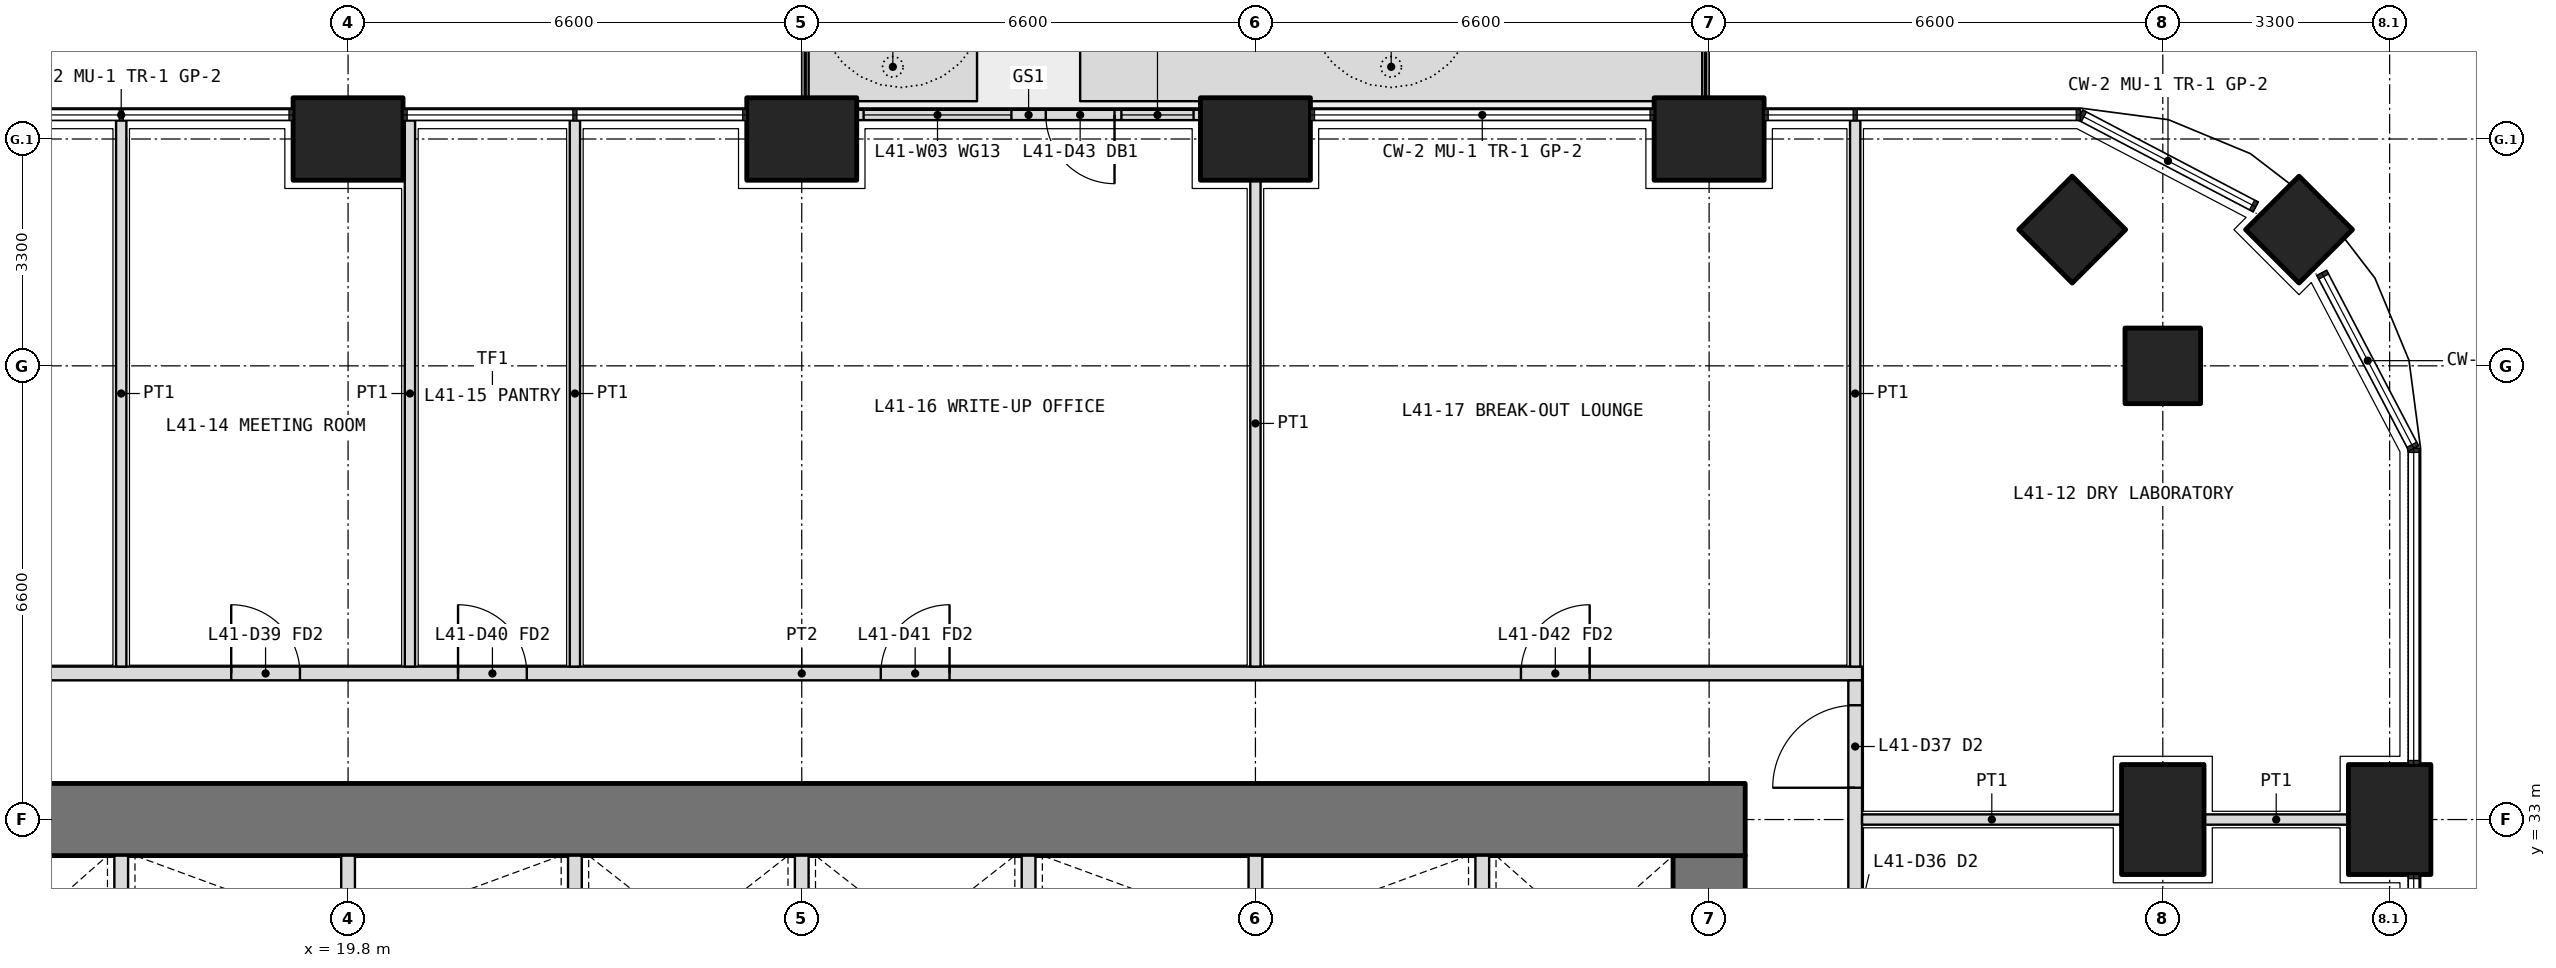
"""IFC4 building model, lengths in metres.
Left out: names, types, materials, properties, quantities, classifications, styles, units other than length and angle.
Written with IfcOpenShell. Run it as: python <this file> out.ifc"""

import sys

from ifc_helpers import new_model, si_unit, direction, frame, frame_2d, origin, origin_2d, place, context, subcontext, project, spatial, polyline, rectangle, outline, extrude, element, fill, save


model = new_model("IFC4")
c1 = context("Model", 3, precision=1e-05, world=origin(), true_north=direction((0.0, 1.0)))
c2 = subcontext(c1, "Body", "Model", "MODEL_VIEW")
j1 = project(units=[si_unit("LENGTHUNIT", "METRE"), si_unit("PLANEANGLEUNIT", "RADIAN")], contexts=[c1])
p1 = place(None, origin())
s1 = spatial("IfcSite", under=j1, at=p1, CompositionType="ELEMENT")
p2 = place(p1, origin())
s2 = spatial("IfcBuilding", under=s1, at=p2, CompositionType="ELEMENT")
p3 = place(p2, frame((0.0, 0.0, 180.9)))
s3 = spatial("IfcBuildingStorey", under=s2, at=p3, CompositionType="ELEMENT", Elevation=180.9)
p4 = place(p3, frame((48.182, 41.582, 0.0), z_axis=(0.0, 0.0, 1.0), x_axis=(0.707106781187, 0.707106781187, 0.0)))
e1 = element("IfcColumn", 1, at=p4, inside=s3, PredefinedType="COLUMN", context=c2, shape_type="SweptSolid", body=[
    extrude(rectangle(XDim=1.1, YDim=1.1, at=origin_2d()), origin(), (0.0, 0.0, 1.0), 4.2),
])
for number, where, z_axis, x_axis in (
    (2, (49.5, 33.0, 0.0), (0.0, 0.0, 1.0), (0.0, 1.0, 0.0)),
    (3, (19.8, 42.9, 0.0), (0.0, 0.0, 1.0), (1.0, 0.0, 0.0)),
    (4, (26.4, 42.9, 0.0), (0.0, 0.0, 1.0), (1.0, 0.0, 0.0)),
    (5, (33.0, 42.9, 0.0), (0.0, 0.0, 1.0), (1.0, 0.0, 0.0)),
    (6, (39.6, 42.9, 0.0), (0.0, 0.0, 1.0), (1.0, 0.0, 0.0)),
):
    element("IfcColumn", number, at=place(p3, frame(where, z_axis=z_axis, x_axis=x_axis)), inside=s3, PredefinedType="COLUMN", context=c2, shape_type="SweptSolid", body=[
        extrude(rectangle(XDim=1.6, YDim=1.2, at=origin_2d()), origin(), (0.0, 0.0, 1.0), 4.2),
    ])
for number, where, z_axis, x_axis in (
    (7, (46.2, 39.6, 0.0), (0.0, 0.0, 1.0), (1.0, 0.0, 0.0)),
    (8, (44.882, 41.582, 0.0), (0.0, 0.0, 1.0), (0.707, 0.707, 0.0)),
):
    element("IfcColumn", number, at=place(p3, frame(where, z_axis=z_axis, x_axis=x_axis)), inside=s3, PredefinedType="COLUMN", context=c2, shape_type="SweptSolid", body=[
        extrude(rectangle(XDim=1.1, YDim=1.1, at=origin_2d()), origin(), (0.0, 0.0, 1.0), 4.2),
    ])
p5 = place(p3, frame((46.2, 33.0, 0.0), z_axis=(0.0, 0.0, 1.0), x_axis=(0.0, 1.0, 0.0)))
e9 = element("IfcColumn", 9, at=p5, inside=s3, PredefinedType="COLUMN", context=c2, shape_type="SweptSolid", body=[
    extrude(rectangle(XDim=1.6, YDim=1.2, at=origin_2d()), origin(), (0.0, 0.0, 1.0), 4.2),
])
p6 = place(p3, origin())
e10 = element("IfcWall", 10, at=p6, inside=s3, PredefinedType="USERDEFINED", context=c2, shape_type="SweptSolid", body=[
    extrude(outline(polyline([(26.5, 43.45), (28.95, 43.45), (28.95, 44.45), (26.5, 44.45), (26.5, 43.45)]), holes=[polyline([(26.65, 43.6), (28.8, 43.6), (28.8, 44.3), (26.65, 44.3), (26.65, 43.6)])]), origin(), (0.0, 0.0, 1.0), 1.05),
])
p7 = place(p3, origin())
e11 = element("IfcWall", 11, at=p7, inside=s3, PredefinedType="USERDEFINED", context=c2, shape_type="SweptSolid", body=[
    extrude(outline(polyline([(30.45, 43.45), (39.5, 43.45), (39.5, 44.45), (30.45, 44.45), (30.45, 43.45)]), holes=[polyline([(30.6, 43.6), (39.35, 43.6), (39.35, 44.3), (30.6, 44.3), (30.6, 43.6)])]), origin(), (0.0, 0.0, 1.0), 1.05),
])
p8 = place(p3, frame((32.2, 43.25, 0.0), z_axis=(0.0, 0.0, 1.0), x_axis=(-1.0, 0.0, 0.0)))
e12 = element("IfcWall", 12, at=p8, inside=s3, PredefinedType="SOLIDWALL", context=c2, shape_type="SweptSolid", body=[
    extrude(rectangle(XDim=5.0, YDim=0.15, at=frame_2d((2.5, 0.0))), origin(), (0.0, 0.0, 1.0), 2.7),
])
p9 = place(p8, frame((1.25, 0.0, 0.0)))
e13 = element("IfcOpeningElement", 13, at=p9, cuts=e12, PredefinedType="OPENING", context=c2, shape_type="SweptSolid", body=[
    extrude(rectangle(XDim=1.0, YDim=2.4, at=frame_2d((0.5, 1.2))), frame((0.0, 0.085, 0.0), z_axis=(0.0, -1.0, 0.0), x_axis=(1.0, 0.0, 0.0)), (0.0, 0.0, 1.0), 0.17),
])
p10 = place(p8, frame((0.1, 0.0, 0.1)))
e14 = element("IfcOpeningElement", 14, at=p10, cuts=e12, PredefinedType="OPENING", context=c2, shape_type="SweptSolid", body=[
    extrude(rectangle(XDim=1.05, YDim=2.3, at=frame_2d((0.525, 1.15))), frame((0.0, 0.085, 0.0), z_axis=(0.0, -1.0, 0.0), x_axis=(1.0, 0.0, 0.0)), (0.0, 0.0, 1.0), 0.17),
])
p11 = place(p8, frame((2.75, 0.0, 0.1)))
e15 = element("IfcOpeningElement", 15, at=p11, cuts=e12, PredefinedType="OPENING", context=c2, shape_type="SweptSolid", body=[
    extrude(rectangle(XDim=2.15, YDim=2.3, at=frame_2d((1.075, 1.15))), frame((0.0, 0.085, 0.0), z_axis=(0.0, -1.0, 0.0), x_axis=(1.0, 0.0, 0.0)), (0.0, 0.0, 1.0), 0.17),
])
p12 = place(p3, frame((39.6, 13.725, 0.0), z_axis=(0.0, 0.0, 1.0), x_axis=(0.0, 1.0, 0.0)))
e16 = element("IfcWall", 16, at=p12, inside=s3, PredefinedType="SHEAR", context=c2, shape_type="SweptSolid", body=[
    extrude(rectangle(XDim=18.75, YDim=1.05, at=frame_2d((9.375, 0.0))), origin(), (0.0, 0.0, 1.0), 4.2),
])
p13 = place(p12, frame((3.025, 0.0, 0.0)))
e17 = element("IfcOpeningElement", 17, at=p13, cuts=e16, PredefinedType="OPENING", context=c2, shape_type="SweptSolid", body=[
    extrude(rectangle(XDim=1.6, YDim=2.1, at=frame_2d((0.8, 1.05))), frame((0.0, 0.535, 0.0), z_axis=(0.0, -1.0, 0.0), x_axis=(1.0, 0.0, 0.0)), (0.0, 0.0, 1.0), 1.07),
])
p14 = place(p12, frame((13.825, 0.0, 0.0)))
e18 = element("IfcOpeningElement", 18, at=p14, cuts=e16, PredefinedType="OPENING", context=c2, shape_type="SweptSolid", body=[
    extrude(rectangle(XDim=1.6, YDim=2.1, at=frame_2d((0.8, 1.05))), frame((0.0, 0.535, 0.0), z_axis=(0.0, -1.0, 0.0), x_axis=(1.0, 0.0, 0.0)), (0.0, 0.0, 1.0), 1.07),
])
p15 = place(p3, frame((40.125, 33.0, 0.0), z_axis=(0.0, 0.0, 1.0), x_axis=(-1.0, 0.0, 0.0)))
e19 = element("IfcWall", 19, at=p15, inside=s3, PredefinedType="SHEAR", context=c2, shape_type="SweptSolid", body=[
    extrude(rectangle(XDim=27.45, YDim=1.05, at=frame_2d((13.725, 0.0))), origin(), (0.0, 0.0, 1.0), 4.2),
])
for number, where, z_axis, x_axis in (
    (20, (16.5, 30.2, 0.0), (0.0, 0.0, 1.0), (0.0, 1.0, 0.0)),
    (21, (19.8, 30.2, 0.0), (0.0, 0.0, 1.0), (0.0, 1.0, 0.0)),
    (22, (23.1, 30.2, 0.0), (0.0, 0.0, 1.0), (0.0, 1.0, 0.0)),
    (23, (26.4, 30.2, 0.0), (0.0, 0.0, 1.0), (0.0, 1.0, 0.0)),
    (24, (29.7, 30.2, 0.0), (0.0, 0.0, 1.0), (0.0, 1.0, 0.0)),
    (25, (33.0, 30.2, 0.0), (0.0, 0.0, 1.0), (0.0, 1.0, 0.0)),
    (26, (36.3, 30.2, 0.0), (0.0, 0.0, 1.0), (0.0, 1.0, 0.0)),
):
    element("IfcWall", number, at=place(p3, frame(where, z_axis=z_axis, x_axis=x_axis)), inside=s3, PredefinedType="PARTITIONING", context=c2, shape_type="SweptSolid", body=[
        extrude(rectangle(XDim=2.275, YDim=0.2, at=frame_2d((1.138, 0.0))), origin(), (0.0, 0.0, 1.0), 4.2),
    ])
p16 = place(p3, frame((10.975, 35.125, 0.0), z_axis=(0.0, 0.0, 1.0), x_axis=(1.0, 0.0, 0.0)))
e27 = element("IfcWall", 27, at=p16, inside=s3, PredefinedType="PARTITIONING", context=c2, shape_type="SweptSolid", body=[
    extrude(rectangle(XDim=30.85, YDim=0.2, at=frame_2d((15.425, 0.0))), origin(), (0.0, 0.0, 1.0), 2.85),
])
p17 = place(p16, frame((2.312, 0.0, 0.0)))
e28 = element("IfcOpeningElement", 28, at=p17, cuts=e27, PredefinedType="OPENING", context=c2, shape_type="SweptSolid", body=[
    extrude(rectangle(XDim=1.0, YDim=2.1, at=frame_2d((0.5, 1.05))), frame((0.0, 0.11, 0.0), z_axis=(0.0, -1.0, 0.0), x_axis=(1.0, 0.0, 0.0)), (0.0, 0.0, 1.0), 0.22),
])
p18 = place(p16, frame((7.125, 0.0, 0.0)))
e29 = element("IfcOpeningElement", 29, at=p18, cuts=e27, PredefinedType="OPENING", context=c2, shape_type="SweptSolid", body=[
    extrude(rectangle(XDim=1.0, YDim=2.1, at=frame_2d((0.5, 1.05))), frame((0.0, 0.11, 0.0), z_axis=(0.0, -1.0, 0.0), x_axis=(1.0, 0.0, 0.0)), (0.0, 0.0, 1.0), 0.22),
])
p19 = place(p16, frame((10.425, 0.0, 0.0)))
e30 = element("IfcOpeningElement", 30, at=p19, cuts=e27, PredefinedType="OPENING", context=c2, shape_type="SweptSolid", body=[
    extrude(rectangle(XDim=1.0, YDim=2.1, at=frame_2d((0.5, 1.05))), frame((0.0, 0.11, 0.0), z_axis=(0.0, -1.0, 0.0), x_axis=(1.0, 0.0, 0.0)), (0.0, 0.0, 1.0), 0.22),
])
p20 = place(p16, frame((16.575, 0.0, 0.0)))
e31 = element("IfcOpeningElement", 31, at=p20, cuts=e27, PredefinedType="OPENING", context=c2, shape_type="SweptSolid", body=[
    extrude(rectangle(XDim=1.0, YDim=2.1, at=frame_2d((0.5, 1.05))), frame((0.0, 0.11, 0.0), z_axis=(0.0, -1.0, 0.0), x_axis=(1.0, 0.0, 0.0)), (0.0, 0.0, 1.0), 0.22),
])
p21 = place(p16, frame((25.887, 0.0, 0.0)))
e32 = element("IfcOpeningElement", 32, at=p21, cuts=e27, PredefinedType="OPENING", context=c2, shape_type="SweptSolid", body=[
    extrude(rectangle(XDim=1.0, YDim=2.1, at=frame_2d((0.5, 1.05))), frame((0.0, 0.11, 0.0), z_axis=(0.0, -1.0, 0.0), x_axis=(1.0, 0.0, 0.0)), (0.0, 0.0, 1.0), 0.22),
])
p22 = place(p3, frame((41.725, 11.175, 0.0), z_axis=(0.0, 0.0, 1.0), x_axis=(0.0, 1.0, 0.0)))
e33 = element("IfcWall", 33, at=p22, inside=s3, PredefinedType="PARTITIONING", context=c2, shape_type="SweptSolid", body=[
    extrude(rectangle(XDim=23.85, YDim=0.2, at=frame_2d((11.925, 0.0))), origin(), (0.0, 0.0, 1.0), 2.85),
])
p23 = place(p22, frame((2.113, 0.0, 0.0)))
e34 = element("IfcOpeningElement", 34, at=p23, cuts=e33, PredefinedType="OPENING", context=c2, shape_type="SweptSolid", body=[
    extrude(rectangle(XDim=1.0, YDim=2.1, at=frame_2d((0.5, 1.05))), frame((0.0, 0.11, 0.0), z_axis=(0.0, -1.0, 0.0), x_axis=(1.0, 0.0, 0.0)), (0.0, 0.0, 1.0), 0.22),
])
p24 = place(p22, frame((6.475, 0.0, 0.0)))
e35 = element("IfcOpeningElement", 35, at=p24, cuts=e33, PredefinedType="OPENING", context=c2, shape_type="SweptSolid", body=[
    extrude(rectangle(XDim=1.0, YDim=2.1, at=frame_2d((0.5, 1.05))), frame((0.0, 0.11, 0.0), z_axis=(0.0, -1.0, 0.0), x_axis=(1.0, 0.0, 0.0)), (0.0, 0.0, 1.0), 0.22),
])
p25 = place(p22, frame((9.625, 0.0, 0.0)))
e36 = element("IfcOpeningElement", 36, at=p25, cuts=e33, PredefinedType="OPENING", context=c2, shape_type="SweptSolid", body=[
    extrude(rectangle(XDim=1.0, YDim=2.1, at=frame_2d((0.5, 1.05))), frame((0.0, 0.11, 0.0), z_axis=(0.0, -1.0, 0.0), x_axis=(1.0, 0.0, 0.0)), (0.0, 0.0, 1.0), 0.22),
])
p26 = place(p22, frame((12.975, 0.0, 0.0)))
e37 = element("IfcOpeningElement", 37, at=p26, cuts=e33, PredefinedType="OPENING", context=c2, shape_type="SweptSolid", body=[
    extrude(rectangle(XDim=0.9, YDim=2.1, at=frame_2d((0.45, 1.05))), frame((0.0, 0.11, 0.0), z_axis=(0.0, -1.0, 0.0), x_axis=(1.0, 0.0, 0.0)), (0.0, 0.0, 1.0), 0.22),
])
p27 = place(p22, frame((16.375, 0.0, 0.0)))
e38 = element("IfcOpeningElement", 38, at=p27, cuts=e33, PredefinedType="OPENING", context=c2, shape_type="SweptSolid", body=[
    extrude(rectangle(XDim=1.0, YDim=2.1, at=frame_2d((0.5, 1.05))), frame((0.0, 0.11, 0.0), z_axis=(0.0, -1.0, 0.0), x_axis=(1.0, 0.0, 0.0)), (0.0, 0.0, 1.0), 0.22),
])
p28 = place(p22, frame((19.575, 0.0, 0.0)))
e39 = element("IfcOpeningElement", 39, at=p28, cuts=e33, PredefinedType="OPENING", context=c2, shape_type="SweptSolid", body=[
    extrude(rectangle(XDim=1.2, YDim=2.1, at=frame_2d((0.6, 1.05))), frame((0.0, 0.11, 0.0), z_axis=(0.0, -1.0, 0.0), x_axis=(1.0, 0.0, 0.0)), (0.0, 0.0, 1.0), 0.22),
])
p29 = place(p22, frame((22.288, 0.0, 0.0)))
e40 = element("IfcOpeningElement", 40, at=p29, cuts=e33, PredefinedType="OPENING", context=c2, shape_type="SweptSolid", body=[
    extrude(rectangle(XDim=1.2, YDim=2.1, at=frame_2d((0.6, 1.05))), frame((0.0, 0.11, 0.0), z_axis=(0.0, -1.0, 0.0), x_axis=(1.0, 0.0, 0.0)), (0.0, 0.0, 1.0), 0.22),
])
p30 = place(p3, frame((41.725, 43.17, 0.0), z_axis=(0.0, 0.0, 1.0), x_axis=(0.0, -1.0, 0.0)))
e41 = element("IfcWall", 41, at=p30, inside=s3, PredefinedType="PARTITIONING", context=c2, shape_type="SweptSolid", body=[
    extrude(rectangle(XDim=7.945, YDim=0.15, at=frame_2d((3.972, 0.0))), origin(), (0.0, 0.0, 1.0), 2.7),
])
p31 = place(p3, frame((48.9, 33.0, 0.0), z_axis=(0.0, 0.0, 1.0), x_axis=(-1.0, 0.0, 0.0)))
e42 = element("IfcWall", 42, at=p31, inside=s3, PredefinedType="PARTITIONING", context=c2, shape_type="SweptSolid", body=[
    extrude(rectangle(XDim=2.1, YDim=0.15, at=frame_2d((1.05, 0.0))), origin(), (0.0, 0.0, 1.0), 2.85),
])
p32 = place(p3, frame((45.6, 33.0, 0.0), z_axis=(0.0, 0.0, 1.0), x_axis=(-1.0, 0.0, 0.0)))
e43 = element("IfcWall", 43, at=p32, inside=s3, PredefinedType="PARTITIONING", context=c2, shape_type="SweptSolid", body=[
    extrude(rectangle(XDim=3.775, YDim=0.15, at=frame_2d((1.888, 0.0))), origin(), (0.0, 0.0, 1.0), 2.85),
])
for number, where, z_axis, x_axis in (
    (44, (20.7, 43.17, 0.0), (0.0, 0.0, 1.0), (0.0, -1.0, 0.0)),
    (45, (23.1, 43.17, 0.0), (0.0, 0.0, 1.0), (0.0, -1.0, 0.0)),
    (46, (16.5, 43.17, 0.0), (0.0, 0.0, 1.0), (0.0, -1.0, 0.0)),
):
    element("IfcWall", number, at=place(p3, frame(where, z_axis=z_axis, x_axis=x_axis)), inside=s3, PredefinedType="PARTITIONING", context=c2, shape_type="SweptSolid", body=[
        extrude(rectangle(XDim=7.945, YDim=0.15, at=frame_2d((3.972, 0.0))), origin(), (0.0, 0.0, 1.0), 2.7),
    ])
p33 = place(p3, frame((33.0, 42.3, 0.0), z_axis=(0.0, 0.0, 1.0), x_axis=(0.0, -1.0, 0.0)))
e47 = element("IfcWall", 47, at=p33, inside=s3, PredefinedType="PARTITIONING", context=c2, shape_type="SweptSolid", body=[
    extrude(rectangle(XDim=7.075, YDim=0.15, at=frame_2d((3.538, 0.0))), origin(), (0.0, 0.0, 1.0), 2.85),
])
p34 = place(p9, origin())
e48 = element("IfcDoor", 48, at=p34, inside=s3, OperationType="SINGLE_SWING_LEFT", PredefinedType="DOOR", context=c2, shape_type="SweptSolid", body=[
    extrude(rectangle(XDim=1.0, YDim=2.4, at=frame_2d((0.5, 1.2))), frame((0.0, 0.025, 0.0), z_axis=(0.0, -1.0, 0.0), x_axis=(1.0, 0.0, 0.0)), (0.0, 0.0, 1.0), 0.05),
])
fill(e13, e48)
p35 = place(p10, origin())
e49 = element("IfcWindow", 49, at=p35, inside=s3, PartitioningType="SINGLE_PANEL", PredefinedType="WINDOW", context=c2, shape_type="SweptSolid", body=[
    extrude(rectangle(XDim=1.05, YDim=2.3, at=frame_2d((0.525, 1.15))), frame((0.0, 0.03, 0.0), z_axis=(0.0, -1.0, 0.0), x_axis=(1.0, 0.0, 0.0)), (0.0, 0.0, 1.0), 0.06),
])
fill(e14, e49)
p36 = place(p11, origin())
e50 = element("IfcWindow", 50, at=p36, inside=s3, PartitioningType="SINGLE_PANEL", PredefinedType="WINDOW", context=c2, shape_type="SweptSolid", body=[
    extrude(rectangle(XDim=2.15, YDim=2.3, at=frame_2d((1.075, 1.15))), frame((0.0, 0.03, 0.0), z_axis=(0.0, -1.0, 0.0), x_axis=(1.0, 0.0, 0.0)), (0.0, 0.0, 1.0), 0.06),
])
fill(e15, e50)
p37 = place(p29, origin())
e51 = element("IfcDoor", 51, at=p37, inside=s3, OperationType="DOUBLE_DOOR_SINGLE_SWING", PredefinedType="DOOR", context=c2, shape_type="SweptSolid", body=[
    extrude(rectangle(XDim=1.2, YDim=2.1, at=frame_2d((0.6, 1.05))), frame((0.0, 0.025, 0.0), z_axis=(0.0, -1.0, 0.0), x_axis=(1.0, 0.0, 0.0)), (0.0, 0.0, 1.0), 0.05),
])
fill(e40, e51)
p38 = place(p18, origin())
e52 = element("IfcDoor", 52, at=p38, inside=s3, OperationType="SINGLE_SWING_LEFT", PredefinedType="DOOR", context=c2, shape_type="SweptSolid", body=[
    extrude(rectangle(XDim=1.0, YDim=2.1, at=frame_2d((0.5, 1.05))), frame((0.0, 0.025, 0.0), z_axis=(0.0, -1.0, 0.0), x_axis=(1.0, 0.0, 0.0)), (0.0, 0.0, 1.0), 0.05),
])
fill(e29, e52)
p39 = place(p19, origin())
e53 = element("IfcDoor", 53, at=p39, inside=s3, OperationType="SINGLE_SWING_LEFT", PredefinedType="DOOR", context=c2, shape_type="SweptSolid", body=[
    extrude(rectangle(XDim=1.0, YDim=2.1, at=frame_2d((0.5, 1.05))), frame((0.0, 0.025, 0.0), z_axis=(0.0, -1.0, 0.0), x_axis=(1.0, 0.0, 0.0)), (0.0, 0.0, 1.0), 0.05),
])
fill(e30, e53)
p40 = place(p20, origin())
e54 = element("IfcDoor", 54, at=p40, inside=s3, OperationType="SINGLE_SWING_RIGHT", PredefinedType="DOOR", context=c2, shape_type="SweptSolid", body=[
    extrude(rectangle(XDim=1.0, YDim=2.1, at=frame_2d((0.5, 1.05))), frame((0.0, 0.025, 0.0), z_axis=(0.0, -1.0, 0.0), x_axis=(1.0, 0.0, 0.0)), (0.0, 0.0, 1.0), 0.05),
])
fill(e31, e54)
p41 = place(p21, origin())
e55 = element("IfcDoor", 55, at=p41, inside=s3, OperationType="SINGLE_SWING_RIGHT", PredefinedType="DOOR", context=c2, shape_type="SweptSolid", body=[
    extrude(rectangle(XDim=1.0, YDim=2.1, at=frame_2d((0.5, 1.05))), frame((0.0, 0.025, 0.0), z_axis=(0.0, -1.0, 0.0), x_axis=(1.0, 0.0, 0.0)), (0.0, 0.0, 1.0), 0.05),
])
fill(e32, e55)
save(model, sys.argv[1])
